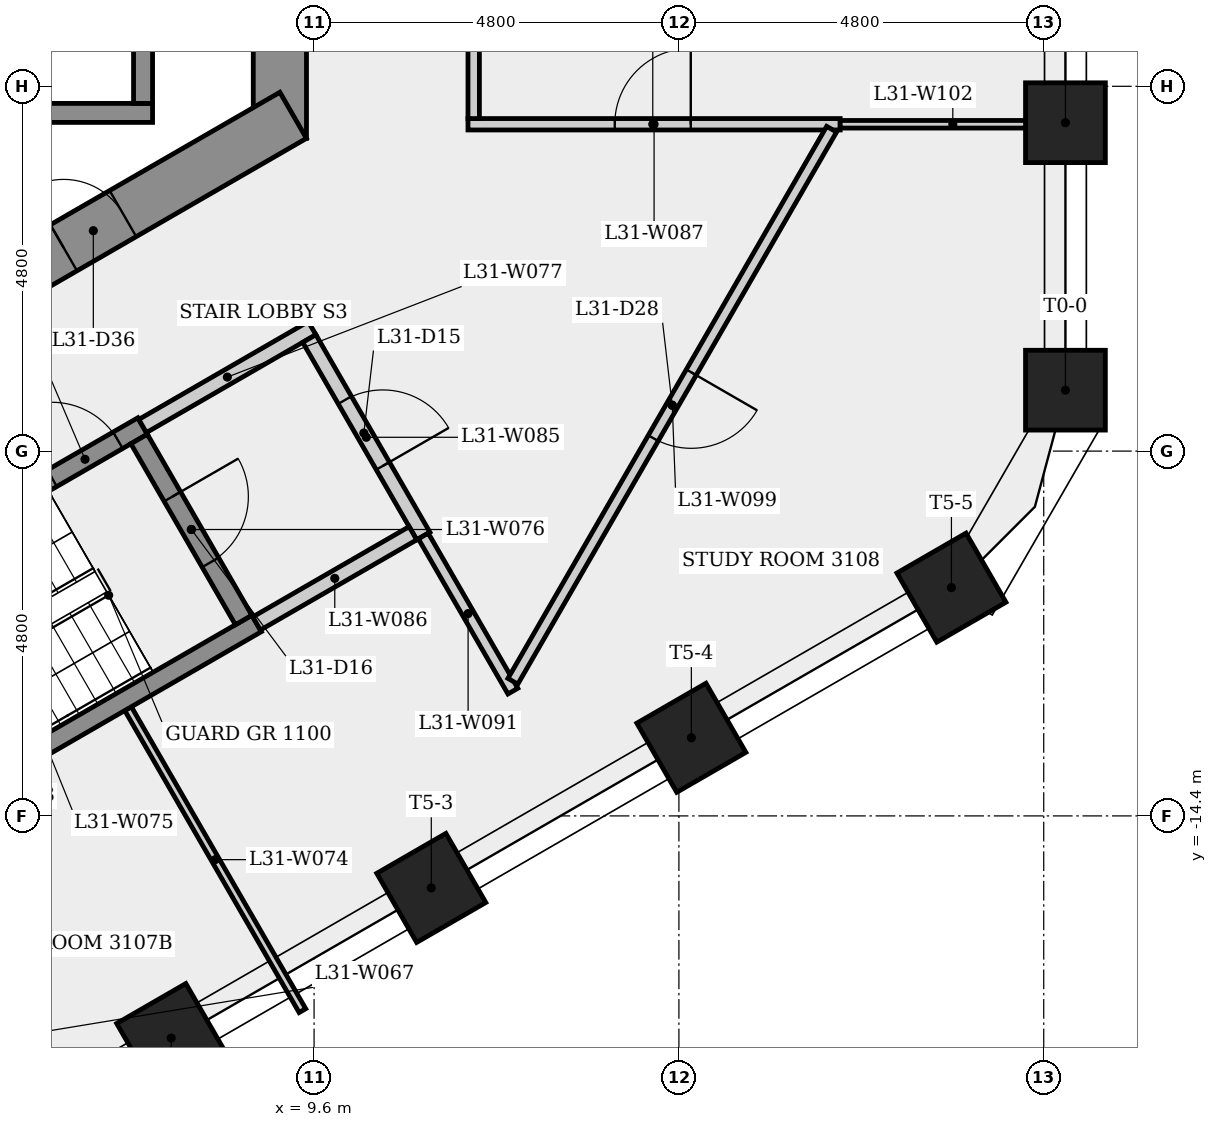
"""IFC4 building model, lengths in metres.
Left out: names, types, materials, properties, quantities, classifications, styles, units other than length and angle.
Written with IfcOpenShell. Run it as: python <this file> out.ifc"""

import sys

from ifc_helpers import new_model, si_unit, direction, frame, frame_2d, origin, origin_2d, place, context, subcontext, project, spatial, rectangle, extrude, element, fill, save


model = new_model("IFC4")
c1 = context("Model", 3, precision=1e-05, world=origin(), true_north=direction((0.0, 1.0)))
c2 = subcontext(c1, "Body", "Model", "MODEL_VIEW")
j1 = project(units=[si_unit("LENGTHUNIT", "METRE"), si_unit("PLANEANGLEUNIT", "RADIAN")], contexts=[c1])
p1 = place(None, origin())
s1 = spatial("IfcSite", under=j1, at=p1, CompositionType="ELEMENT")
p2 = place(p1, origin())
s2 = spatial("IfcBuilding", under=s1, at=p2, CompositionType="ELEMENT")
p3 = place(p2, frame((0.0, 0.0, 117.1)))
s3 = spatial("IfcBuildingStorey", under=s2, at=p3, CompositionType="ELEMENT", Elevation=117.1)
p4 = place(p3, frame((9.15, -5.485, 0.0), z_axis=(0.0, 0.0, 1.0), x_axis=(0.0, 1.0, 0.0)))
e1 = element("IfcWall", 1, at=p4, inside=s3, PredefinedType="SHEAR", context=c2, shape_type="SweptSolid", body=[
    extrude(rectangle(XDim=10.97, YDim=0.7, at=frame_2d((5.485, 0.0))), origin(), (0.0, 0.0, 1.0), 3.4),
])
p5 = place(p4, frame((4.685, 0.0, 0.0)))
e2 = element("IfcOpeningElement", 2, at=p5, cuts=e1, PredefinedType="OPENING", context=c2, shape_type="SweptSolid", body=[
    extrude(rectangle(XDim=1.6, YDim=2.1, at=frame_2d((0.8, 1.05))), frame((0.0, 0.36, 0.0), z_axis=(0.0, -1.0, 0.0), x_axis=(1.0, 0.0, 0.0)), (0.0, 0.0, 1.0), 0.72),
])
p6 = place(p3, frame((-0.175, -10.667, 0.0), z_axis=(0.0, 0.0, 1.0), x_axis=(0.866023993627, 0.500002442456, 0.0)))
e3 = element("IfcWall", 3, at=p6, inside=s3, PredefinedType="SHEAR", context=c2, shape_type="SweptSolid", body=[
    extrude(rectangle(XDim=10.97, YDim=0.7, at=frame_2d((5.485, 0.0))), origin(), (0.0, 0.0, 1.0), 3.4),
])
p7 = place(p6, frame((0.9, 0.0, 0.0)))
e4 = element("IfcOpeningElement", 4, at=p7, cuts=e3, PredefinedType="OPENING", context=c2, shape_type="SweptSolid", body=[
    extrude(rectangle(XDim=0.9, YDim=2.1, at=frame_2d((0.45, 1.05))), frame((0.0, 0.36, 0.0), z_axis=(0.0, -1.0, 0.0), x_axis=(1.0, 0.0, 0.0)), (0.0, 0.0, 1.0), 0.72),
])
p8 = place(p6, frame((7.483, 0.0, 0.0)))
e5 = element("IfcOpeningElement", 5, at=p8, cuts=e3, PredefinedType="OPENING", context=c2, shape_type="SweptSolid", body=[
    extrude(rectangle(XDim=0.9, YDim=2.1, at=frame_2d((0.45, 1.05))), frame((0.0, 0.36, 0.0), z_axis=(0.0, -1.0, 0.0), x_axis=(1.0, 0.0, 0.0)), (0.0, 0.0, 1.0), 0.72),
])
for number, where, z_axis, x_axis in (
    (6, (19.486, -8.798, 0.0), (0.0, 0.0, 1.0), (1.0, 0.0, 0.0)),
    (7, (19.486, -5.279, 0.0), (0.0, 0.0, 1.0), (1.0, 0.0, 0.0)),
    (8, (7.72, -17.323, 0.0), (0.0, 0.0, 1.0), (0.5, -0.866, 0.0)),
    (9, (11.142, -15.348, 0.0), (0.0, 0.0, 1.0), (0.5, -0.866, 0.0)),
    (10, (14.564, -13.372, 0.0), (0.0, 0.0, 1.0), (0.5, -0.866, 0.0)),
    (11, (17.986, -11.396, 0.0), (0.0, 0.0, 1.0), (0.5, -0.866, 0.0)),
):
    element("IfcColumn", number, at=place(p3, frame(where, z_axis=z_axis, x_axis=x_axis)), inside=s3, PredefinedType="COLUMN", context=c2, shape_type="SweptSolid", body=[
        extrude(rectangle(XDim=1.05, YDim=1.05, at=origin_2d()), origin(), (0.0, 0.0, 1.0), 3.4),
    ])
p9 = place(p3, frame((-7.225, -5.15, 0.0), z_axis=(0.0, 0.0, 1.0), x_axis=(1.0, 0.0, 0.0)))
e12 = element("IfcWall", 12, at=p9, inside=s3, PredefinedType="SHEAR", context=c2, shape_type="SweptSolid", body=[
    extrude(rectangle(XDim=14.7, YDim=0.25, at=frame_2d((7.35, 0.0))), origin(), (0.0, 0.0, 1.0), 3.0),
])
p10 = place(p3, frame((1.585, -12.595, 0.0), z_axis=(0.0, 0.0, 1.0), x_axis=(0.866036417653, 0.499980922934, 0.0)))
e13 = element("IfcWall", 13, at=p10, inside=s3, PredefinedType="SHEAR", context=c2, shape_type="SweptSolid", body=[
    extrude(rectangle(XDim=6.65, YDim=0.25, at=frame_2d((3.325, 0.0))), origin(), (0.0, 0.0, 1.0), 3.0),
])
p11 = place(p10, frame((5.275, 0.0, 0.0)))
e14 = element("IfcOpeningElement", 14, at=p11, cuts=e13, PredefinedType="OPENING", context=c2, shape_type="SweptSolid", body=[
    extrude(rectangle(XDim=1.0, YDim=2.1, at=frame_2d((0.5, 1.05))), frame((0.0, 0.135, 0.0), z_axis=(0.0, -1.0, 0.0), x_axis=(1.0, 0.0, 0.0)), (0.0, 0.0, 1.0), 0.27),
])
p12 = place(p3, frame((7.153, -12.989, 0.0), z_axis=(0.0, 0.0, 1.0), x_axis=(0.500024917322, -0.866011017284, 0.0)))
e15 = element("IfcWall", 15, at=p12, inside=s3, PredefinedType="PARTITIONING", context=c2, shape_type="SweptSolid", body=[
    extrude(rectangle(XDim=4.588, YDim=0.1, at=frame_2d((2.294, 0.0))), origin(), (0.0, 0.0, 1.0), 3.0),
])
p13 = place(p3, frame((3.301, -15.068, 0.0), z_axis=(0.0, 0.0, 1.0), x_axis=(0.866035036182, 0.499983315828, 0.0)))
e16 = element("IfcWall", 16, at=p13, inside=s3, PredefinedType="SHEAR", context=c2, shape_type="SweptSolid", body=[
    extrude(rectangle(XDim=6.4, YDim=0.25, at=frame_2d((3.2, 0.0))), origin(), (0.0, 0.0, 1.0), 3.0),
])
p14 = place(p3, frame((7.298, -9.441, 0.0), z_axis=(0.0, 0.0, 1.0), x_axis=(0.500034990121, -0.866005201286, 0.0)))
e17 = element("IfcWall", 17, at=p14, inside=s3, PredefinedType="SHEAR", context=c2, shape_type="SweptSolid", body=[
    extrude(rectangle(XDim=2.75, YDim=0.25, at=frame_2d((1.375, 0.0))), origin(), (0.0, 0.0, 1.0), 3.0),
])
p15 = place(p14, frame((0.875, 0.0, 0.0)))
e18 = element("IfcOpeningElement", 18, at=p15, cuts=e17, PredefinedType="OPENING", context=c2, shape_type="SweptSolid", body=[
    extrude(rectangle(XDim=1.0, YDim=2.1, at=frame_2d((0.5, 1.05))), frame((0.0, 0.135, 0.0), z_axis=(0.0, -1.0, 0.0), x_axis=(1.0, 0.0, 0.0)), (0.0, 0.0, 1.0), 0.27),
])
p16 = place(p3, frame((7.344, -9.27, 0.0), z_axis=(0.0, 0.0, 1.0), x_axis=(0.866005588531, 0.500034319456, 0.0)))
e19 = element("IfcWall", 19, at=p16, inside=s3, PredefinedType="PARTITIONING", context=c2, shape_type="SweptSolid", body=[
    extrude(rectangle(XDim=2.575, YDim=0.2, at=frame_2d((1.288, 0.0))), origin(), (0.0, 0.0, 1.0), 3.0),
])
p17 = place(p3, frame((7.35, -1.925, 0.0), z_axis=(0.0, 0.0, 1.0), x_axis=(0.0, -1.0, 0.0)))
e20 = element("IfcWall", 20, at=p17, inside=s3, PredefinedType="SHEAR", context=c2, shape_type="SweptSolid", body=[
    extrude(rectangle(XDim=3.1, YDim=0.25, at=frame_2d((1.55, 0.0))), origin(), (0.0, 0.0, 1.0), 3.4),
])
p18 = place(p3, frame((9.537, -8.119, 0.0), z_axis=(0.0, 0.0, 1.0), x_axis=(0.499990139034, -0.866031096941, 0.0)))
e21 = element("IfcWall", 21, at=p18, inside=s3, PredefinedType="PARTITIONING", context=c2, shape_type="SweptSolid", body=[
    extrude(rectangle(XDim=3.0, YDim=0.2, at=frame_2d((1.5, 0.0))), origin(), (0.0, 0.0, 1.0), 3.0),
])
p19 = place(p18, frame((0.935, 0.0, 0.0)))
e22 = element("IfcOpeningElement", 22, at=p19, cuts=e21, PredefinedType="OPENING", context=c2, shape_type="SweptSolid", body=[
    extrude(rectangle(XDim=1.0, YDim=2.1, at=frame_2d((0.5, 1.05))), frame((0.0, 0.11, 0.0), z_axis=(0.0, -1.0, 0.0), x_axis=(1.0, 0.0, 0.0)), (0.0, 0.0, 1.0), 0.22),
])
p20 = place(p3, frame((10.901, -10.681, 0.0), z_axis=(0.0, 0.0, 1.0), x_axis=(-0.866007538022, -0.500030943131, 0.0)))
e23 = element("IfcWall", 23, at=p20, inside=s3, PredefinedType="PARTITIONING", context=c2, shape_type="SweptSolid", body=[
    extrude(rectangle(XDim=2.375, YDim=0.2, at=frame_2d((1.188, 0.0))), origin(), (0.0, 0.0, 1.0), 3.0),
])
p21 = place(p3, frame((11.625, -5.3, 0.0), z_axis=(0.0, 0.0, 1.0), x_axis=(1.0, 0.0, 0.0)))
e24 = element("IfcWall", 24, at=p21, inside=s3, PredefinedType="PARTITIONING", context=c2, shape_type="SweptSolid", body=[
    extrude(rectangle(XDim=4.897, YDim=0.15, at=frame_2d((2.448, 0.0))), origin(), (0.0, 0.0, 1.0), 3.0),
])
p22 = place(p21, frame((1.931, 0.0, 0.0)))
e25 = element("IfcOpeningElement", 25, at=p22, cuts=e24, PredefinedType="OPENING", context=c2, shape_type="SweptSolid", body=[
    extrude(rectangle(XDim=1.0, YDim=2.1, at=frame_2d((0.5, 1.05))), frame((0.0, 0.085, 0.0), z_axis=(0.0, -1.0, 0.0), x_axis=(1.0, 0.0, 0.0)), (0.0, 0.0, 1.0), 0.17),
])
p23 = place(p3, frame((11.7, -5.225, 0.0), z_axis=(0.0, 0.0, 1.0), x_axis=(0.0, 1.0, 0.0)))
e26 = element("IfcWall", 26, at=p23, inside=s3, PredefinedType="PARTITIONING", context=c2, shape_type="SweptSolid", body=[
    extrude(rectangle(XDim=10.399, YDim=0.15, at=frame_2d((5.2, 0.0))), origin(), (0.0, 0.0, 1.0), 3.0),
])
p24 = place(p23, frame((6.865, 0.0, 0.0)))
e27 = element("IfcOpeningElement", 27, at=p24, cuts=e26, PredefinedType="OPENING", context=c2, shape_type="SweptSolid", body=[
    extrude(rectangle(XDim=1.0, YDim=2.1, at=frame_2d((0.5, 1.05))), frame((0.0, 0.085, 0.0), z_axis=(0.0, -1.0, 0.0), x_axis=(1.0, 0.0, 0.0)), (0.0, 0.0, 1.0), 0.17),
])
p25 = place(p3, frame((12.216, -12.758, 0.0), z_axis=(0.0, 0.0, 1.0), x_axis=(-0.499982474044, 0.866035522163, 0.0)))
e28 = element("IfcWall", 28, at=p25, inside=s3, PredefinedType="PARTITIONING", context=c2, shape_type="SweptSolid", body=[
    extrude(rectangle(XDim=2.357, YDim=0.15, at=frame_2d((1.178, 0.0))), origin(), (0.0, 0.0, 1.0), 3.0),
])
p26 = place(p3, frame((16.409, -5.365, 0.0), z_axis=(0.0, 0.0, 1.0), x_axis=(-0.499980296409, -0.866036779359, 0.0)))
e29 = element("IfcWall", 29, at=p26, inside=s3, PredefinedType="PARTITIONING", context=c2, shape_type="SweptSolid", body=[
    extrude(rectangle(XDim=8.387, YDim=0.15, at=frame_2d((4.194, 0.0))), origin(), (0.0, 0.0, 1.0), 3.0),
])
p27 = place(p26, frame((3.694, 0.0, 0.0)))
e30 = element("IfcOpeningElement", 30, at=p27, cuts=e29, PredefinedType="OPENING", context=c2, shape_type="SweptSolid", body=[
    extrude(rectangle(XDim=1.0, YDim=2.1, at=frame_2d((0.5, 1.05))), frame((0.0, 0.085, 0.0), z_axis=(0.0, -1.0, 0.0), x_axis=(1.0, 0.0, 0.0)), (0.0, 0.0, 1.0), 0.17),
])
p28 = place(p3, frame((19.486, -5.3, 0.0), z_axis=(0.0, 0.0, 1.0), x_axis=(-1.0, 0.0, 0.0)))
e31 = element("IfcWall", 31, at=p28, inside=s3, PredefinedType="PARTITIONING", context=c2, shape_type="SweptSolid", body=[
    extrude(rectangle(XDim=2.964, YDim=0.1, at=frame_2d((1.482, 0.0))), origin(), (0.0, 0.0, 1.0), 3.0),
])
p29 = place(p11, origin())
e32 = element("IfcDoor", 32, at=p29, inside=s3, OperationType="SINGLE_SWING_LEFT", PredefinedType="DOOR", context=c2, shape_type="SweptSolid", body=[
    extrude(rectangle(XDim=1.0, YDim=2.1, at=frame_2d((0.5, 1.05))), frame((0.0, 0.025, 0.0), z_axis=(0.0, -1.0, 0.0), x_axis=(1.0, 0.0, 0.0)), (0.0, 0.0, 1.0), 0.05),
])
fill(e14, e32)
p30 = place(p19, origin())
e33 = element("IfcDoor", 33, at=p30, inside=s3, OperationType="SINGLE_SWING_RIGHT", PredefinedType="DOOR", context=c2, shape_type="SweptSolid", body=[
    extrude(rectangle(XDim=1.0, YDim=2.1, at=frame_2d((0.5, 1.05))), frame((0.0, 0.025, 0.0), z_axis=(0.0, -1.0, 0.0), x_axis=(1.0, 0.0, 0.0)), (0.0, 0.0, 1.0), 0.05),
])
fill(e22, e33)
p31 = place(p15, origin())
e34 = element("IfcDoor", 34, at=p31, inside=s3, OperationType="SINGLE_SWING_LEFT", PredefinedType="DOOR", context=c2, shape_type="SweptSolid", body=[
    extrude(rectangle(XDim=1.0, YDim=2.1, at=frame_2d((0.5, 1.05))), frame((0.0, 0.025, 0.0), z_axis=(0.0, -1.0, 0.0), x_axis=(1.0, 0.0, 0.0)), (0.0, 0.0, 1.0), 0.05),
])
fill(e18, e34)
p32 = place(p22, origin())
e35 = element("IfcDoor", 35, at=p32, inside=s3, OperationType="SINGLE_SWING_RIGHT", PredefinedType="DOOR", context=c2, shape_type="SweptSolid", body=[
    extrude(rectangle(XDim=1.0, YDim=2.1, at=frame_2d((0.5, 1.05))), frame((0.0, 0.025, 0.0), z_axis=(0.0, -1.0, 0.0), x_axis=(1.0, 0.0, 0.0)), (0.0, 0.0, 1.0), 0.05),
])
fill(e25, e35)
p33 = place(p27, origin())
e36 = element("IfcDoor", 36, at=p33, inside=s3, OperationType="SINGLE_SWING_LEFT", PredefinedType="DOOR", context=c2, shape_type="SweptSolid", body=[
    extrude(rectangle(XDim=1.0, YDim=2.1, at=frame_2d((0.5, 1.05))), frame((0.0, 0.025, 0.0), z_axis=(0.0, -1.0, 0.0), x_axis=(1.0, 0.0, 0.0)), (0.0, 0.0, 1.0), 0.05),
])
fill(e30, e36)
p34 = place(p8, origin())
e37 = element("IfcDoor", 37, at=p34, inside=s3, OperationType="SINGLE_SWING_LEFT", PredefinedType="DOOR", context=c2, shape_type="SweptSolid", body=[
    extrude(rectangle(XDim=0.9, YDim=2.1, at=frame_2d((0.45, 1.05))), frame((0.0, 0.025, 0.0), z_axis=(0.0, -1.0, 0.0), x_axis=(1.0, 0.0, 0.0)), (0.0, 0.0, 1.0), 0.05),
])
fill(e5, e37)
save(model, sys.argv[1])
